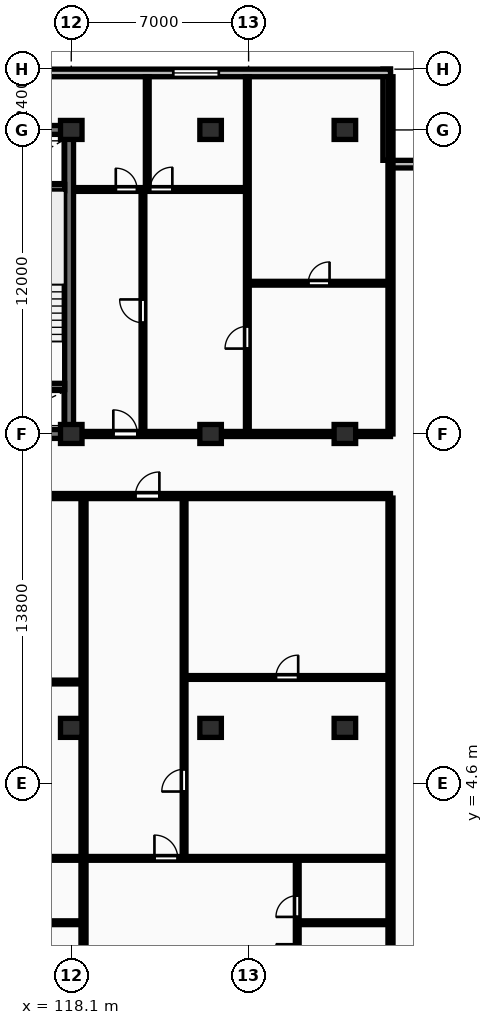
"""IFC4 building model, lengths in metres.
Left out: names, types, materials, properties, quantities, classifications, styles, units other than length and angle.
Written with IfcOpenShell. Run it as: python <this file> out.ifc"""

import sys

from ifc_helpers import new_model, si_unit, direction, frame, frame_2d, origin, origin_2d, place, context, subcontext, project, spatial, rectangle, extrude, element, fill, save


model = new_model("IFC4")
c1 = context("Model", 3, precision=1e-05, world=origin(), true_north=direction((0.0, 1.0)))
c2 = subcontext(c1, "Body", "Model", "MODEL_VIEW")
j1 = project(units=[si_unit("LENGTHUNIT", "METRE"), si_unit("PLANEANGLEUNIT", "RADIAN")], contexts=[c1])
p1 = place(None, origin())
s1 = spatial("IfcSite", under=j1, at=p1, CompositionType="ELEMENT")
p2 = place(p1, origin())
s2 = spatial("IfcBuilding", under=s1, at=p2, CompositionType="ELEMENT")
p3 = place(p2, frame((0.0, 0.0, 113.3)))
s3 = spatial("IfcBuildingStorey", under=s2, at=p3, CompositionType="ELEMENT", Elevation=113.3)
for number, where, z_axis, x_axis in (
    (1, (118.1, 6.8, 0.0), (0.0, 0.0, 1.0), (1.0, 0.0, 0.0)),
    (2, (118.1, 18.4, 0.0), (0.0, 0.0, 1.0), (1.0, 0.0, 0.0)),
    (3, (118.1, 30.4, 0.0), (0.0, 0.0, 1.0), (1.0, 0.0, 0.0)),
    (4, (123.6, 6.8, 0.0), (0.0, 0.0, 1.0), (1.0, 0.0, 0.0)),
    (5, (123.6, 18.4, 0.0), (0.0, 0.0, 1.0), (1.0, 0.0, 0.0)),
    (6, (123.6, 30.4, 0.0), (0.0, 0.0, 1.0), (1.0, 0.0, 0.0)),
    (7, (128.9, 6.8, 0.0), (0.0, 0.0, 1.0), (1.0, 0.0, 0.0)),
    (8, (128.9, 18.4, 0.0), (0.0, 0.0, 1.0), (1.0, 0.0, 0.0)),
    (9, (128.9, 30.4, 0.0), (0.0, 0.0, 1.0), (1.0, 0.0, 0.0)),
):
    element("IfcColumn", number, at=place(p3, frame(where, z_axis=z_axis, x_axis=x_axis)), inside=s3, PredefinedType="COLUMN", context=c2, shape_type="SweptSolid", body=[
        extrude(rectangle(XDim=0.85, YDim=0.75, at=origin_2d()), origin(), (0.0, 0.0, 1.0), 3.25),
    ])
for number, where, z_axis, x_axis in (
    (10, (134.3, 29.05, 0.0), (0.0, 0.0, 1.0), (-1.0, 0.0, 0.0)),
    (11, (130.55, 29.2, 0.0), (0.0, 0.0, 1.0), (0.0, 1.0, 0.0)),
):
    element("IfcWall", number, at=place(p3, frame(where, z_axis=z_axis, x_axis=x_axis)), inside=s3, PredefinedType="STANDARD", context=c2, shape_type="SweptSolid", body=[
        extrude(rectangle(XDim=3.6, YDim=0.3, at=frame_2d((1.8, 0.0))), origin(), (0.0, 0.0, 1.0), 2.97),
    ])
p4 = place(p3, frame((130.7, 32.65, 0.0), z_axis=(0.0, 0.0, 1.0), x_axis=(-1.0, 0.0, 0.0)))
e12 = element("IfcWall", 12, at=p4, inside=s3, PredefinedType="STANDARD", context=c2, shape_type="SweptSolid", body=[
    extrude(rectangle(XDim=58.0, YDim=0.3, at=frame_2d((29.0, 0.0))), origin(), (0.0, 0.0, 1.0), 2.97),
])
p5 = place(p4, frame((50.125, 0.0, 0.85)))
e13 = element("IfcOpeningElement", 13, at=p5, cuts=e12, PredefinedType="OPENING", context=c2, shape_type="SweptSolid", body=[
    extrude(rectangle(XDim=1.8, YDim=1.8, at=frame_2d((0.9, 0.9))), frame((0.0, 0.16, 0.0), z_axis=(0.0, -1.0, 0.0), x_axis=(1.0, 0.0, 0.0)), (0.0, 0.0, 1.0), 0.32),
])
p6 = place(p4, frame((6.775, 0.0, 0.85)))
e14 = element("IfcOpeningElement", 14, at=p6, cuts=e12, PredefinedType="OPENING", context=c2, shape_type="SweptSolid", body=[
    extrude(rectangle(XDim=1.8, YDim=1.8, at=frame_2d((0.9, 0.9))), frame((0.0, 0.16, 0.0), z_axis=(0.0, -1.0, 0.0), x_axis=(1.0, 0.0, 0.0)), (0.0, 0.0, 1.0), 0.32),
])
p7 = place(p3, frame((81.925, 30.4, 0.0), z_axis=(0.0, 0.0, 1.0), x_axis=(1.0, 0.0, 0.0)))
e15 = element("IfcWall", 15, at=p7, inside=s3, PredefinedType="SHEAR", context=c2, shape_type="SweptSolid", body=[
    extrude(rectangle(XDim=36.265, YDim=0.35, at=frame_2d((18.132, 0.0))), origin(), (0.0, 0.0, 1.0), 3.25),
])
p8 = place(p3, frame((118.015, 18.575, 0.0), z_axis=(0.0, 0.0, 1.0), x_axis=(0.0, 1.0, 0.0)))
e16 = element("IfcWall", 16, at=p8, inside=s3, PredefinedType="SHEAR", context=c2, shape_type="SweptSolid", body=[
    extrude(rectangle(XDim=11.65, YDim=0.35, at=frame_2d((5.825, 0.0))), origin(), (0.0, 0.0, 1.0), 3.25),
])
p9 = place(p3, frame((81.925, 18.4, 0.0), z_axis=(0.0, 0.0, 1.0), x_axis=(1.0, 0.0, 0.0)))
e17 = element("IfcWall", 17, at=p9, inside=s3, PredefinedType="SHEAR", context=c2, shape_type="SweptSolid", body=[
    extrude(rectangle(XDim=36.265, YDim=0.35, at=frame_2d((18.132, 0.0))), origin(), (0.0, 0.0, 1.0), 3.25),
])
p10 = place(p9, frame((5.675, 0.0, 0.0)))
e18 = element("IfcOpeningElement", 18, at=p10, cuts=e17, PredefinedType="OPENING", context=c2, shape_type="SweptSolid", body=[
    extrude(rectangle(XDim=1.0, YDim=2.15, at=frame_2d((0.5, 1.075))), frame((0.0, 0.185, 0.0), z_axis=(0.0, -1.0, 0.0), x_axis=(1.0, 0.0, 0.0)), (0.0, 0.0, 1.0), 0.37),
])
p11 = place(p9, frame((21.925, 0.0, 0.0)))
e19 = element("IfcOpeningElement", 19, at=p11, cuts=e17, PredefinedType="OPENING", context=c2, shape_type="SweptSolid", body=[
    extrude(rectangle(XDim=1.5, YDim=2.2, at=frame_2d((0.75, 1.1))), frame((0.0, 0.185, 0.0), z_axis=(0.0, -1.0, 0.0), x_axis=(1.0, 0.0, 0.0)), (0.0, 0.0, 1.0), 0.37),
])
p12 = place(p9, frame((29.875, 0.0, 0.0)))
e20 = element("IfcOpeningElement", 20, at=p12, cuts=e17, PredefinedType="OPENING", context=c2, shape_type="SweptSolid", body=[
    extrude(rectangle(XDim=1.0, YDim=2.15, at=frame_2d((0.5, 1.075))), frame((0.0, 0.185, 0.0), z_axis=(0.0, -1.0, 0.0), x_axis=(1.0, 0.0, 0.0)), (0.0, 0.0, 1.0), 0.37),
])
for number, where, z_axis, x_axis in (
    (21, (114.6, 20.275, 0.0), (0.0, 0.0, 1.0), (1.0, 0.0, 0.0)),
    (22, (114.6, 28.125, 0.0), (0.0, 0.0, 1.0), (1.0, 0.0, 0.0)),
):
    element("IfcWall", number, at=place(p3, frame(where, z_axis=z_axis, x_axis=x_axis)), inside=s3, PredefinedType="SHEAR", context=c2, shape_type="SweptSolid", body=[
        extrude(rectangle(XDim=3.24, YDim=0.25, at=frame_2d((1.62, 0.0))), origin(), (0.0, 0.0, 1.0), 3.25),
    ])
p13 = place(p3, frame((130.7, 18.4, 0.0), z_axis=(0.0, 0.0, 1.0), x_axis=(0.0, 1.0, 0.0)))
e23 = element("IfcWall", 23, at=p13, inside=s3, PredefinedType="PARTITIONING", context=c2, shape_type="SweptSolid", body=[
    extrude(rectangle(XDim=14.1, YDim=0.2, at=frame_2d((7.05, 0.0))), origin(), (0.0, 0.0, 1.0), 2.97),
])
p14 = place(p3, frame((125.05, 24.35, 0.0), z_axis=(0.0, 0.0, 1.0), x_axis=(1.0, 0.0, 0.0)))
e24 = element("IfcWall", 24, at=p14, inside=s3, PredefinedType="PARTITIONING", context=c2, shape_type="SweptSolid", body=[
    extrude(rectangle(XDim=5.65, YDim=0.15, at=frame_2d((2.825, 0.0))), origin(), (0.0, 0.0, 1.0), 2.97),
])
p15 = place(p14, frame((2.405, 0.0, 0.0)))
e25 = element("IfcOpeningElement", 25, at=p15, cuts=e24, PredefinedType="OPENING", context=c2, shape_type="SweptSolid", body=[
    extrude(rectangle(XDim=0.84, YDim=2.04, at=frame_2d((0.42, 1.02))), frame((0.0, 0.085, 0.0), z_axis=(0.0, -1.0, 0.0), x_axis=(1.0, 0.0, 0.0)), (0.0, 0.0, 1.0), 0.17),
])
p16 = place(p3, frame((125.05, 18.45, 0.0), z_axis=(0.0, 0.0, 1.0), x_axis=(0.0, 1.0, 0.0)))
e26 = element("IfcWall", 26, at=p16, inside=s3, PredefinedType="PARTITIONING", context=c2, shape_type="SweptSolid", body=[
    extrude(rectangle(XDim=14.05, YDim=0.15, at=frame_2d((7.025, 0.0))), origin(), (0.0, 0.0, 1.0), 2.97),
])
p17 = place(p16, frame((3.32, 0.0, 0.0)))
e27 = element("IfcOpeningElement", 27, at=p17, cuts=e26, PredefinedType="OPENING", context=c2, shape_type="SweptSolid", body=[
    extrude(rectangle(XDim=0.88, YDim=2.06, at=frame_2d((0.44, 1.03))), frame((0.0, 0.085, 0.0), z_axis=(0.0, -1.0, 0.0), x_axis=(1.0, 0.0, 0.0)), (0.0, 0.0, 1.0), 0.17),
])
p18 = place(p3, frame((120.93, 18.45, 0.0), z_axis=(0.0, 0.0, 1.0), x_axis=(0.0, 1.0, 0.0)))
e28 = element("IfcWall", 28, at=p18, inside=s3, PredefinedType="PARTITIONING", context=c2, shape_type="SweptSolid", body=[
    extrude(rectangle(XDim=9.6, YDim=0.15, at=frame_2d((4.8, 0.0))), origin(), (0.0, 0.0, 1.0), 2.97),
])
p19 = place(p18, frame((4.34, 0.0, 0.0)))
e29 = element("IfcOpeningElement", 29, at=p19, cuts=e28, PredefinedType="OPENING", context=c2, shape_type="SweptSolid", body=[
    extrude(rectangle(XDim=0.92, YDim=2.08, at=frame_2d((0.46, 1.04))), frame((0.0, 0.085, 0.0), z_axis=(0.0, -1.0, 0.0), x_axis=(1.0, 0.0, 0.0)), (0.0, 0.0, 1.0), 0.17),
])
p20 = place(p3, frame((121.1, 28.05, 0.0), z_axis=(0.0, 0.0, 1.0), x_axis=(0.0, 1.0, 0.0)))
e30 = element("IfcWall", 30, at=p20, inside=s3, PredefinedType="PARTITIONING", context=c2, shape_type="SweptSolid", body=[
    extrude(rectangle(XDim=4.45, YDim=0.15, at=frame_2d((2.225, 0.0))), origin(), (0.0, 0.0, 1.0), 2.97),
])
p21 = place(p3, frame((118.27, 28.05, 0.0), z_axis=(0.0, 0.0, 1.0), x_axis=(1.0, 0.0, 0.0)))
e31 = element("IfcWall", 31, at=p21, inside=s3, PredefinedType="PARTITIONING", context=c2, shape_type="SweptSolid", body=[
    extrude(rectangle(XDim=6.76, YDim=0.15, at=frame_2d((3.38, 0.0))), origin(), (0.0, 0.0, 1.0), 2.97),
])
p22 = place(p21, frame((1.587, 0.0, 0.0)))
e32 = element("IfcOpeningElement", 32, at=p22, cuts=e31, PredefinedType="OPENING", context=c2, shape_type="SweptSolid", body=[
    extrude(rectangle(XDim=0.84, YDim=2.04, at=frame_2d((0.42, 1.02))), frame((0.0, 0.085, 0.0), z_axis=(0.0, -1.0, 0.0), x_axis=(1.0, 0.0, 0.0)), (0.0, 0.0, 1.0), 0.17),
])
p23 = place(p21, frame((2.94, 0.0, 0.0)))
e33 = element("IfcOpeningElement", 33, at=p23, cuts=e31, PredefinedType="OPENING", context=c2, shape_type="SweptSolid", body=[
    extrude(rectangle(XDim=0.88, YDim=2.06, at=frame_2d((0.44, 1.03))), frame((0.0, 0.085, 0.0), z_axis=(0.0, -1.0, 0.0), x_axis=(1.0, 0.0, 0.0)), (0.0, 0.0, 1.0), 0.17),
])
p24 = place(p3, frame((118.25, 18.4, 0.0), z_axis=(0.0, 0.0, 1.0), x_axis=(1.0, 0.0, 0.0)))
e34 = element("IfcWall", 34, at=p24, inside=s3, PredefinedType="PARTITIONING", context=c2, shape_type="SweptSolid", body=[
    extrude(rectangle(XDim=12.45, YDim=0.2, at=frame_2d((6.225, 0.0))), origin(), (0.0, 0.0, 1.0), 2.358),
])
p25 = place(p24, frame((1.51, 0.0, 0.0)))
e35 = element("IfcOpeningElement", 35, at=p25, cuts=e34, PredefinedType="OPENING", context=c2, shape_type="SweptSolid", body=[
    extrude(rectangle(XDim=0.95, YDim=2.15, at=frame_2d((0.475, 1.075))), frame((0.0, 0.11, 0.0), z_axis=(0.0, -1.0, 0.0), x_axis=(1.0, 0.0, 0.0)), (0.0, 0.0, 1.0), 0.22),
])
for number, where, z_axis, x_axis in (
    (36, (130.7, -8.7, 0.0), (0.0, 0.0, 1.0), (0.0, 1.0, 0.0)),
    (37, (118.583, -8.7, 0.0), (0.0, 0.0, 1.0), (0.0, 1.0, 0.0)),
):
    element("IfcWall", number, at=place(p3, frame(where, z_axis=z_axis, x_axis=x_axis)), inside=s3, PredefinedType="PARTITIONING", context=c2, shape_type="SweptSolid", body=[
        extrude(rectangle(XDim=24.57, YDim=0.2, at=frame_2d((12.285, 0.0))), origin(), (0.0, 0.0, 1.0), 2.97),
    ])
p26 = place(p3, frame((108.78, 8.61, 0.0), z_axis=(0.0, 0.0, 1.0), x_axis=(1.0, 0.0, 0.0)))
e38 = element("IfcWall", 38, at=p26, inside=s3, PredefinedType="PARTITIONING", context=c2, shape_type="SweptSolid", body=[
    extrude(rectangle(XDim=9.723, YDim=0.15, at=frame_2d((4.862, 0.0))), origin(), (0.0, 0.0, 1.0), 2.97),
])
p27 = place(p26, frame((3.792, 0.0, 0.0)))
e39 = element("IfcOpeningElement", 39, at=p27, cuts=e38, PredefinedType="OPENING", context=c2, shape_type="SweptSolid", body=[
    extrude(rectangle(XDim=0.88, YDim=2.06, at=frame_2d((0.44, 1.03))), frame((0.0, 0.085, 0.0), z_axis=(0.0, -1.0, 0.0), x_axis=(1.0, 0.0, 0.0)), (0.0, 0.0, 1.0), 0.17),
])
p28 = place(p3, frame((115.223, -0.89, 0.0), z_axis=(0.0, 0.0, 1.0), x_axis=(1.0, 0.0, 0.0)))
e40 = element("IfcWall", 40, at=p28, inside=s3, PredefinedType="PARTITIONING", context=c2, shape_type="SweptSolid", body=[
    extrude(rectangle(XDim=3.28, YDim=0.15, at=frame_2d((1.64, 0.0))), origin(), (0.0, 0.0, 1.0), 2.97),
])
p29 = place(p3, frame((104.83, 1.65, 0.0), z_axis=(0.0, 0.0, 1.0), x_axis=(1.0, 0.0, 0.0)))
e41 = element("IfcWall", 41, at=p29, inside=s3, PredefinedType="PARTITIONING", context=c2, shape_type="SweptSolid", body=[
    extrude(rectangle(XDim=13.673, YDim=0.15, at=frame_2d((6.837, 0.0))), origin(), (0.0, 0.0, 1.0), 2.97),
])
p30 = place(p29, frame((2.72, 0.0, 0.0)))
e42 = element("IfcOpeningElement", 42, at=p30, cuts=e41, PredefinedType="OPENING", context=c2, shape_type="SweptSolid", body=[
    extrude(rectangle(XDim=0.92, YDim=2.08, at=frame_2d((0.46, 1.04))), frame((0.0, 0.085, 0.0), z_axis=(0.0, -1.0, 0.0), x_axis=(1.0, 0.0, 0.0)), (0.0, 0.0, 1.0), 0.17),
])
p31 = place(p3, frame((122.613, 8.79, 0.0), z_axis=(0.0, 0.0, 1.0), x_axis=(1.0, 0.0, 0.0)))
e43 = element("IfcWall", 43, at=p31, inside=s3, PredefinedType="PARTITIONING", context=c2, shape_type="SweptSolid", body=[
    extrude(rectangle(XDim=8.007, YDim=0.15, at=frame_2d((4.003, 0.0))), origin(), (0.0, 0.0, 1.0), 2.97),
])
p32 = place(p31, frame((3.563, 0.0, 0.0)))
e44 = element("IfcOpeningElement", 44, at=p32, cuts=e43, PredefinedType="OPENING", context=c2, shape_type="SweptSolid", body=[
    extrude(rectangle(XDim=0.88, YDim=2.06, at=frame_2d((0.44, 1.03))), frame((0.0, 0.085, 0.0), z_axis=(0.0, -1.0, 0.0), x_axis=(1.0, 0.0, 0.0)), (0.0, 0.0, 1.0), 0.17),
])
p33 = place(p3, frame((122.553, 1.69, 0.0), z_axis=(0.0, 0.0, 1.0), x_axis=(0.0, 1.0, 0.0)))
e45 = element("IfcWall", 45, at=p33, inside=s3, PredefinedType="PARTITIONING", context=c2, shape_type="SweptSolid", body=[
    extrude(rectangle(XDim=14.2, YDim=0.15, at=frame_2d((7.1, 0.0))), origin(), (0.0, 0.0, 1.0), 2.97),
])
p34 = place(p33, frame((2.598, 0.0, 0.0)))
e46 = element("IfcOpeningElement", 46, at=p34, cuts=e45, PredefinedType="OPENING", context=c2, shape_type="SweptSolid", body=[
    extrude(rectangle(XDim=0.88, YDim=2.06, at=frame_2d((0.44, 1.03))), frame((0.0, 0.085, 0.0), z_axis=(0.0, -1.0, 0.0), x_axis=(1.0, 0.0, 0.0)), (0.0, 0.0, 1.0), 0.17),
])
p35 = place(p3, frame((127.08, -0.89, 0.0), z_axis=(0.0, 0.0, 1.0), x_axis=(1.0, 0.0, 0.0)))
e47 = element("IfcWall", 47, at=p35, inside=s3, PredefinedType="PARTITIONING", context=c2, shape_type="SweptSolid", body=[
    extrude(rectangle(XDim=3.54, YDim=0.15, at=frame_2d((1.77, 0.0))), origin(), (0.0, 0.0, 1.0), 2.97),
])
p36 = place(p3, frame((127.02, -8.7, 0.0), z_axis=(0.0, 0.0, 1.0), x_axis=(0.0, 1.0, 0.0)))
e48 = element("IfcWall", 48, at=p36, inside=s3, PredefinedType="PARTITIONING", context=c2, shape_type="SweptSolid", body=[
    extrude(rectangle(XDim=10.31, YDim=0.15, at=frame_2d((5.155, 0.0))), origin(), (0.0, 0.0, 1.0), 2.97),
])
p37 = place(p36, frame((6.12, 0.0, 0.0)))
e49 = element("IfcOpeningElement", 49, at=p37, cuts=e48, PredefinedType="OPENING", context=c2, shape_type="SweptSolid", body=[
    extrude(rectangle(XDim=0.84, YDim=2.04, at=frame_2d((0.42, 1.02))), frame((0.0, 0.085, 0.0), z_axis=(0.0, -1.0, 0.0), x_axis=(1.0, 0.0, 0.0)), (0.0, 0.0, 1.0), 0.17),
])
p38 = place(p36, frame((8.04, 0.0, 0.0)))
e50 = element("IfcOpeningElement", 50, at=p38, cuts=e48, PredefinedType="OPENING", context=c2, shape_type="SweptSolid", body=[
    extrude(rectangle(XDim=0.84, YDim=2.04, at=frame_2d((0.42, 1.02))), frame((0.0, 0.085, 0.0), z_axis=(0.0, -1.0, 0.0), x_axis=(1.0, 0.0, 0.0)), (0.0, 0.0, 1.0), 0.17),
])
p39 = place(p36, frame((2.001, 0.0, 0.0)))
e51 = element("IfcOpeningElement", 51, at=p39, cuts=e48, PredefinedType="OPENING", context=c2, shape_type="SweptSolid", body=[
    extrude(rectangle(XDim=0.88, YDim=2.06, at=frame_2d((0.44, 1.03))), frame((0.0, 0.085, 0.0), z_axis=(0.0, -1.0, 0.0), x_axis=(1.0, 0.0, 0.0)), (0.0, 0.0, 1.0), 0.17),
])
p40 = place(p3, frame((118.663, 1.65, 0.0), z_axis=(0.0, 0.0, 1.0), x_axis=(1.0, 0.0, 0.0)))
e52 = element("IfcWall", 52, at=p40, inside=s3, PredefinedType="PARTITIONING", context=c2, shape_type="SweptSolid", body=[
    extrude(rectangle(XDim=11.957, YDim=0.15, at=frame_2d((5.979, 0.0))), origin(), (0.0, 0.0, 1.0), 2.97),
])
p41 = place(p40, frame((2.72, 0.0, 0.0)))
e53 = element("IfcOpeningElement", 53, at=p41, cuts=e52, PredefinedType="OPENING", context=c2, shape_type="SweptSolid", body=[
    extrude(rectangle(XDim=0.92, YDim=2.08, at=frame_2d((0.46, 1.04))), frame((0.0, 0.085, 0.0), z_axis=(0.0, -1.0, 0.0), x_axis=(1.0, 0.0, 0.0)), (0.0, 0.0, 1.0), 0.17),
])
p42 = place(p3, frame((72.7, 15.95, 0.0), z_axis=(0.0, 0.0, 1.0), x_axis=(1.0, 0.0, 0.0)))
e54 = element("IfcWall", 54, at=p42, inside=s3, PredefinedType="PARTITIONING", context=c2, shape_type="SweptSolid", body=[
    extrude(rectangle(XDim=58.0, YDim=0.2, at=frame_2d((29.0, 0.0))), origin(), (0.0, 0.0, 1.0), 2.97),
])
p43 = place(p42, frame((6.373, 0.0, 0.0)))
e55 = element("IfcOpeningElement", 55, at=p43, cuts=e54, PredefinedType="OPENING", context=c2, shape_type="SweptSolid", body=[
    extrude(rectangle(XDim=1.22, YDim=2.18, at=frame_2d((0.61, 1.09))), frame((0.0, 0.11, 0.0), z_axis=(0.0, -1.0, 0.0), x_axis=(1.0, 0.0, 0.0)), (0.0, 0.0, 1.0), 0.22),
])
p44 = place(p42, frame((21.678, 0.0, 0.0)))
e56 = element("IfcOpeningElement", 56, at=p44, cuts=e54, PredefinedType="OPENING", context=c2, shape_type="SweptSolid", body=[
    extrude(rectangle(XDim=0.95, YDim=2.15, at=frame_2d((0.475, 1.075))), frame((0.0, 0.11, 0.0), z_axis=(0.0, -1.0, 0.0), x_axis=(1.0, 0.0, 0.0)), (0.0, 0.0, 1.0), 0.22),
])
p45 = place(p42, frame((33.812, 0.0, 0.0)))
e57 = element("IfcOpeningElement", 57, at=p45, cuts=e54, PredefinedType="OPENING", context=c2, shape_type="SweptSolid", body=[
    extrude(rectangle(XDim=0.95, YDim=2.15, at=frame_2d((0.475, 1.075))), frame((0.0, 0.11, 0.0), z_axis=(0.0, -1.0, 0.0), x_axis=(1.0, 0.0, 0.0)), (0.0, 0.0, 1.0), 0.22),
])
p46 = place(p42, frame((47.928, 0.0, 0.0)))
e58 = element("IfcOpeningElement", 58, at=p46, cuts=e54, PredefinedType="OPENING", context=c2, shape_type="SweptSolid", body=[
    extrude(rectangle(XDim=0.95, YDim=2.15, at=frame_2d((0.475, 1.075))), frame((0.0, 0.11, 0.0), z_axis=(0.0, -1.0, 0.0), x_axis=(1.0, 0.0, 0.0)), (0.0, 0.0, 1.0), 0.22),
])
p47 = place(p6, origin())
e59 = element("IfcWindow", 59, at=p47, inside=s3, PartitioningType="SINGLE_PANEL", PredefinedType="WINDOW", context=c2, shape_type="SweptSolid", body=[
    extrude(rectangle(XDim=1.8, YDim=1.8, at=frame_2d((0.9, 0.9))), frame((0.0, 0.03, 0.0), z_axis=(0.0, -1.0, 0.0), x_axis=(1.0, 0.0, 0.0)), (0.0, 0.0, 1.0), 0.06),
])
fill(e14, e59)
p48 = place(p15, origin())
e60 = element("IfcDoor", 60, at=p48, inside=s3, OperationType="SINGLE_SWING_RIGHT", PredefinedType="DOOR", context=c2, shape_type="SweptSolid", body=[
    extrude(rectangle(XDim=0.84, YDim=2.04, at=frame_2d((0.42, 1.02))), frame((0.0, 0.025, 0.0), z_axis=(0.0, -1.0, 0.0), x_axis=(1.0, 0.0, 0.0)), (0.0, 0.0, 1.0), 0.05),
])
fill(e25, e60)
p49 = place(p17, origin())
e61 = element("IfcDoor", 61, at=p49, inside=s3, OperationType="SINGLE_SWING_LEFT", PredefinedType="DOOR", context=c2, shape_type="SweptSolid", body=[
    extrude(rectangle(XDim=0.88, YDim=2.06, at=frame_2d((0.44, 1.03))), frame((0.0, 0.025, 0.0), z_axis=(0.0, -1.0, 0.0), x_axis=(1.0, 0.0, 0.0)), (0.0, 0.0, 1.0), 0.05),
])
fill(e27, e61)
p50 = place(p19, origin())
e62 = element("IfcDoor", 62, at=p50, inside=s3, OperationType="SINGLE_SWING_RIGHT", PredefinedType="DOOR", context=c2, shape_type="SweptSolid", body=[
    extrude(rectangle(XDim=0.92, YDim=2.08, at=frame_2d((0.46, 1.04))), frame((0.0, 0.025, 0.0), z_axis=(0.0, -1.0, 0.0), x_axis=(1.0, 0.0, 0.0)), (0.0, 0.0, 1.0), 0.05),
])
fill(e29, e62)
p51 = place(p22, origin())
e63 = element("IfcDoor", 63, at=p51, inside=s3, OperationType="SINGLE_SWING_LEFT", PredefinedType="DOOR", context=c2, shape_type="SweptSolid", body=[
    extrude(rectangle(XDim=0.84, YDim=2.04, at=frame_2d((0.42, 1.02))), frame((0.0, 0.025, 0.0), z_axis=(0.0, -1.0, 0.0), x_axis=(1.0, 0.0, 0.0)), (0.0, 0.0, 1.0), 0.05),
])
fill(e32, e63)
p52 = place(p23, origin())
e64 = element("IfcDoor", 64, at=p52, inside=s3, OperationType="SINGLE_SWING_RIGHT", PredefinedType="DOOR", context=c2, shape_type="SweptSolid", body=[
    extrude(rectangle(XDim=0.88, YDim=2.06, at=frame_2d((0.44, 1.03))), frame((0.0, 0.025, 0.0), z_axis=(0.0, -1.0, 0.0), x_axis=(1.0, 0.0, 0.0)), (0.0, 0.0, 1.0), 0.05),
])
fill(e33, e64)
p53 = place(p25, origin())
e65 = element("IfcDoor", 65, at=p53, inside=s3, OperationType="SINGLE_SWING_LEFT", PredefinedType="DOOR", context=c2, shape_type="SweptSolid", body=[
    extrude(rectangle(XDim=0.95, YDim=2.15, at=frame_2d((0.475, 1.075))), frame((0.0, 0.025, 0.0), z_axis=(0.0, -1.0, 0.0), x_axis=(1.0, 0.0, 0.0)), (0.0, 0.0, 1.0), 0.05),
])
fill(e35, e65)
p54 = place(p32, origin())
e66 = element("IfcDoor", 66, at=p54, inside=s3, OperationType="SINGLE_SWING_RIGHT", PredefinedType="DOOR", context=c2, shape_type="SweptSolid", body=[
    extrude(rectangle(XDim=0.88, YDim=2.06, at=frame_2d((0.44, 1.03))), frame((0.0, 0.025, 0.0), z_axis=(0.0, -1.0, 0.0), x_axis=(1.0, 0.0, 0.0)), (0.0, 0.0, 1.0), 0.05),
])
fill(e44, e66)
p55 = place(p34, origin())
e67 = element("IfcDoor", 67, at=p55, inside=s3, OperationType="SINGLE_SWING_LEFT", PredefinedType="DOOR", context=c2, shape_type="SweptSolid", body=[
    extrude(rectangle(XDim=0.88, YDim=2.06, at=frame_2d((0.44, 1.03))), frame((0.0, 0.025, 0.0), z_axis=(0.0, -1.0, 0.0), x_axis=(1.0, 0.0, 0.0)), (0.0, 0.0, 1.0), 0.05),
])
fill(e46, e67)
p56 = place(p37, origin())
e68 = element("IfcDoor", 68, at=p56, inside=s3, OperationType="SINGLE_SWING_RIGHT", PredefinedType="DOOR", context=c2, shape_type="SweptSolid", body=[
    extrude(rectangle(XDim=0.84, YDim=2.04, at=frame_2d((0.42, 1.02))), frame((0.0, 0.025, 0.0), z_axis=(0.0, -1.0, 0.0), x_axis=(1.0, 0.0, 0.0)), (0.0, 0.0, 1.0), 0.05),
])
fill(e49, e68)
p57 = place(p38, origin())
e69 = element("IfcDoor", 69, at=p57, inside=s3, OperationType="SINGLE_SWING_LEFT", PredefinedType="DOOR", context=c2, shape_type="SweptSolid", body=[
    extrude(rectangle(XDim=0.84, YDim=2.04, at=frame_2d((0.42, 1.02))), frame((0.0, 0.025, 0.0), z_axis=(0.0, -1.0, 0.0), x_axis=(1.0, 0.0, 0.0)), (0.0, 0.0, 1.0), 0.05),
])
fill(e50, e69)
p58 = place(p41, origin())
e70 = element("IfcDoor", 70, at=p58, inside=s3, OperationType="SINGLE_SWING_LEFT", PredefinedType="DOOR", context=c2, shape_type="SweptSolid", body=[
    extrude(rectangle(XDim=0.92, YDim=2.08, at=frame_2d((0.46, 1.04))), frame((0.0, 0.025, 0.0), z_axis=(0.0, -1.0, 0.0), x_axis=(1.0, 0.0, 0.0)), (0.0, 0.0, 1.0), 0.05),
])
fill(e53, e70)
p59 = place(p46, origin())
e71 = element("IfcDoor", 71, at=p59, inside=s3, OperationType="SINGLE_SWING_RIGHT", PredefinedType="DOOR", context=c2, shape_type="SweptSolid", body=[
    extrude(rectangle(XDim=0.95, YDim=2.15, at=frame_2d((0.475, 1.075))), frame((0.0, 0.025, 0.0), z_axis=(0.0, -1.0, 0.0), x_axis=(1.0, 0.0, 0.0)), (0.0, 0.0, 1.0), 0.05),
])
fill(e58, e71)
save(model, sys.argv[1])
